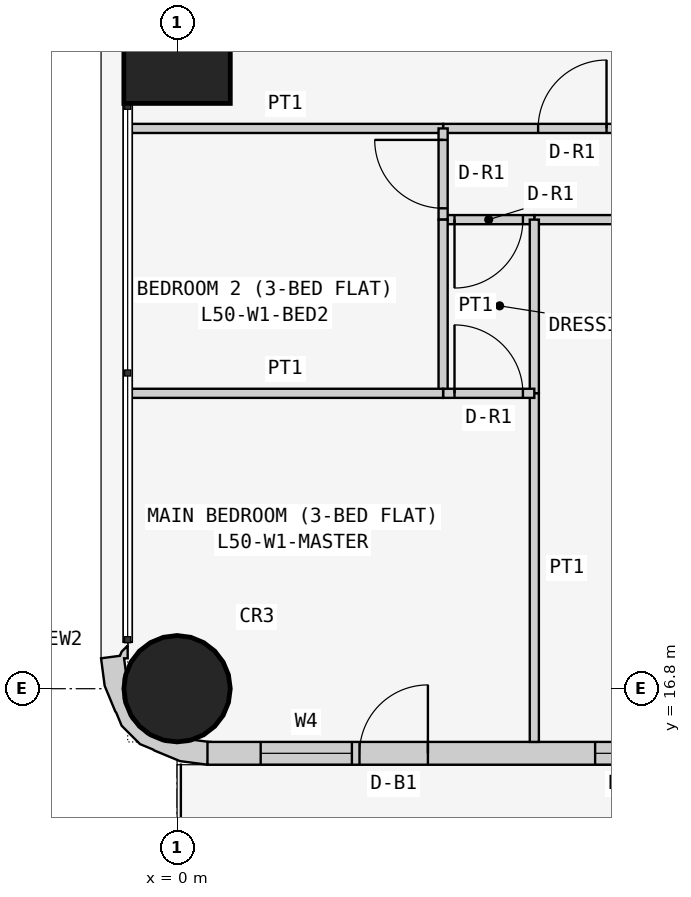
"""IFC4 building model, lengths in metres.
Left out: names, types, materials, properties, quantities, classifications, styles, units other than length and angle.
Written with IfcOpenShell. Run it as: python <this file> out.ifc"""

import sys

from ifc_helpers import new_model, si_unit, direction, frame, frame_2d, origin, origin_2d, place, context, subcontext, project, spatial, polyline, rectangle, circle, outline, extrude, element, fill, save


model = new_model("IFC4")
c1 = context("Model", 3, precision=1e-05, world=origin(), true_north=direction((0.0, 1.0)))
c2 = subcontext(c1, "Body", "Model", "MODEL_VIEW")
j1 = project(units=[si_unit("LENGTHUNIT", "METRE"), si_unit("PLANEANGLEUNIT", "RADIAN")], contexts=[c1])
p1 = place(None, origin())
s1 = spatial("IfcSite", under=j1, at=p1, CompositionType="ELEMENT")
p2 = place(p1, origin())
s2 = spatial("IfcBuilding", under=s1, at=p2, CompositionType="ELEMENT")
p3 = place(p2, frame((0.0, 0.0, 194.1)))
s3 = spatial("IfcBuildingStorey", under=s2, at=p3, CompositionType="ELEMENT", Elevation=194.1)
p4 = place(p3, frame((0.0, 16.8, 0.0), z_axis=(0.0, 0.0, 1.0), x_axis=(1.0, 0.0, 0.0)))
e1 = element("IfcColumn", 1, at=p4, inside=s3, PredefinedType="COLUMN", context=c2, shape_type="SweptSolid", body=[
    extrude(circle(Radius=0.7, at=origin_2d()), origin(), (0.0, 0.0, 1.0), 3.6),
])
p5 = place(p3, frame((0.0, 25.2, 0.0), z_axis=(0.0, 0.0, 1.0), x_axis=(1.0, 0.0, 0.0)))
e2 = element("IfcColumn", 2, at=p5, inside=s3, PredefinedType="COLUMN", context=c2, shape_type="SweptSolid", body=[
    extrude(rectangle(XDim=1.4, YDim=1.4, at=origin_2d()), origin(), (0.0, 0.0, 1.0), 3.6),
])
p6 = place(p3, frame((0.4, 15.95, 0.0), z_axis=(0.0, 0.0, 1.0), x_axis=(1.0, 0.0, 0.0)))
e3 = element("IfcWall", 3, at=p6, inside=s3, PredefinedType="SOLIDWALL", context=c2, shape_type="SweptSolid", body=[
    extrude(rectangle(XDim=15.7, YDim=0.3, at=frame_2d((7.85, 0.0))), origin(), (0.0, 0.0, 1.0), 3.45),
])
p7 = place(p6, frame((12.4, 0.0, 0.9)))
e4 = element("IfcOpeningElement", 4, at=p7, cuts=e3, PredefinedType="OPENING", context=c2, shape_type="SweptSolid", body=[
    extrude(rectangle(XDim=1.8, YDim=1.5, at=frame_2d((0.9, 0.75))), frame((0.0, 0.16, 0.0), z_axis=(0.0, -1.0, 0.0), x_axis=(1.0, 0.0, 0.0)), (0.0, 0.0, 1.0), 0.32),
])
p8 = place(p6, frame((9.55, 0.0, 1.5)))
e5 = element("IfcOpeningElement", 5, at=p8, cuts=e3, PredefinedType="OPENING", context=c2, shape_type="SweptSolid", body=[
    extrude(rectangle(XDim=0.9, YDim=0.7, at=frame_2d((0.45, 0.35))), frame((0.0, 0.16, 0.0), z_axis=(0.0, -1.0, 0.0), x_axis=(1.0, 0.0, 0.0)), (0.0, 0.0, 1.0), 0.32),
])
p9 = place(p6, frame((5.1, 0.0, 0.9)))
e6 = element("IfcOpeningElement", 6, at=p9, cuts=e3, PredefinedType="OPENING", context=c2, shape_type="SweptSolid", body=[
    extrude(rectangle(XDim=1.8, YDim=1.5, at=frame_2d((0.9, 0.75))), frame((0.0, 0.16, 0.0), z_axis=(0.0, -1.0, 0.0), x_axis=(1.0, 0.0, 0.0)), (0.0, 0.0, 1.0), 0.32),
])
p10 = place(p6, frame((2.0, 0.0, 0.0)))
e7 = element("IfcOpeningElement", 7, at=p10, cuts=e3, PredefinedType="OPENING", context=c2, shape_type="SweptSolid", body=[
    extrude(rectangle(XDim=0.9, YDim=2.4, at=frame_2d((0.45, 1.2))), frame((0.0, 0.16, 0.0), z_axis=(0.0, -1.0, 0.0), x_axis=(1.0, 0.0, 0.0)), (0.0, 0.0, 1.0), 0.32),
])
p11 = place(p6, frame((0.7, 0.0, 0.9)))
e8 = element("IfcOpeningElement", 8, at=p11, cuts=e3, PredefinedType="OPENING", context=c2, shape_type="SweptSolid", body=[
    extrude(rectangle(XDim=1.2, YDim=1.5, at=frame_2d((0.6, 0.75))), frame((0.0, 0.16, 0.0), z_axis=(0.0, -1.0, 0.0), x_axis=(1.0, 0.0, 0.0)), (0.0, 0.0, 1.0), 0.32),
])
p12 = place(p3, frame((-0.588, 17.312, 0.0), z_axis=(0.0, 0.0, 1.0), x_axis=(-0.898030234854, -0.439933741929, 0.0)))
e9 = element("IfcWall", 9, at=p12, inside=s3, PredefinedType="SOLIDWALL", context=c2, shape_type="SweptSolid", body=[
    extrude(outline(polyline([(-0.222, 1.793), (-0.39, 1.541), (-0.372, 1.532), (-0.195, 1.415), (-0.12, 1.41), (0.131, 1.287), (0.315, 1.078), (0.406, 0.814), (0.388, 0.536), (0.265, 0.285), (0.209, 0.236), (0.148, 0.053), (0.105, 0.074), (0.032, -0.076), (0.138, -0.039), (0.182, -0.0), (0.419, -0.08), (0.536, 0.266), (0.559, 0.631), (0.555, 0.651), (0.566, 0.836), (0.456, 1.159), (0.333, 1.298), (0.324, 1.316), (0.082, 1.591), (-0.222, 1.793)])), origin(), (0.0, 0.0, 1.0), 3.45),
])
p13 = place(p3, frame((3.5, 24.171, 0.0), z_axis=(0.0, 0.0, 1.0), x_axis=(1.0, 0.0, 0.0)))
e10 = element("IfcWall", 10, at=p13, inside=s3, PredefinedType="PARTITIONING", context=c2, shape_type="SweptSolid", body=[
    extrude(rectangle(XDim=2.7, YDim=0.12, at=frame_2d((1.35, 0.0))), origin(), (0.0, 0.0, 1.0), 3.45),
])
p14 = place(p13, frame((1.25, 0.0, 0.0)))
e11 = element("IfcOpeningElement", 11, at=p14, cuts=e10, PredefinedType="OPENING", context=c2, shape_type="SweptSolid", body=[
    extrude(rectangle(XDim=0.9, YDim=2.1, at=frame_2d((0.45, 1.05))), frame((0.0, 0.07, 0.0), z_axis=(0.0, -1.0, 0.0), x_axis=(1.0, 0.0, 0.0)), (0.0, 0.0, 1.0), 0.14),
])
p15 = place(p3, frame((-0.65, 24.171, 0.0), z_axis=(0.0, 0.0, 1.0), x_axis=(1.0, 0.0, 0.0)))
e12 = element("IfcWall", 12, at=p15, inside=s3, PredefinedType="PARTITIONING", context=c2, shape_type="SweptSolid", body=[
    extrude(rectangle(XDim=4.15, YDim=0.12, at=frame_2d((2.075, 0.0))), origin(), (0.0, 0.0, 1.0), 3.45),
])
p16 = place(p3, frame((4.7, 22.971, 0.0), z_axis=(0.0, 0.0, 1.0), x_axis=(1.0, 0.0, 0.0)))
e13 = element("IfcWall", 13, at=p16, inside=s3, PredefinedType="PARTITIONING", context=c2, shape_type="SweptSolid", body=[
    extrude(rectangle(XDim=4.9, YDim=0.12, at=frame_2d((2.45, 0.0))), origin(), (0.0, 0.0, 1.0), 3.45),
])
p17 = place(p16, frame((1.65, 0.0, 0.0)))
e14 = element("IfcOpeningElement", 14, at=p17, cuts=e13, PredefinedType="OPENING", context=c2, shape_type="SweptSolid", body=[
    extrude(rectangle(XDim=0.9, YDim=2.1, at=frame_2d((0.45, 1.05))), frame((0.0, 0.07, 0.0), z_axis=(0.0, -1.0, 0.0), x_axis=(1.0, 0.0, 0.0)), (0.0, 0.0, 1.0), 0.14),
])
p18 = place(p3, frame((3.5, 22.971, 0.0), z_axis=(0.0, 0.0, 1.0), x_axis=(1.0, 0.0, 0.0)))
e15 = element("IfcWall", 15, at=p18, inside=s3, PredefinedType="PARTITIONING", context=c2, shape_type="SweptSolid", body=[
    extrude(rectangle(XDim=1.2, YDim=0.12, at=frame_2d((0.6, 0.0))), origin(), (0.0, 0.0, 1.0), 3.45),
])
p19 = place(p18, frame((0.15, 0.0, 0.0)))
e16 = element("IfcOpeningElement", 16, at=p19, cuts=e15, PredefinedType="OPENING", context=c2, shape_type="SweptSolid", body=[
    extrude(rectangle(XDim=0.9, YDim=2.1, at=frame_2d((0.45, 1.05))), frame((0.0, 0.07, 0.0), z_axis=(0.0, -1.0, 0.0), x_axis=(1.0, 0.0, 0.0)), (0.0, 0.0, 1.0), 0.14),
])
p20 = place(p3, frame((3.5, 24.171, 0.0), z_axis=(0.0, 0.0, 1.0), x_axis=(0.0, -1.0, 0.0)))
e17 = element("IfcWall", 17, at=p20, inside=s3, PredefinedType="PARTITIONING", context=c2, shape_type="SweptSolid", body=[
    extrude(rectangle(XDim=1.2, YDim=0.12, at=frame_2d((0.6, 0.0))), origin(), (0.0, 0.0, 1.0), 3.45),
])
p21 = place(p20, frame((0.151, 0.0, 0.0)))
e18 = element("IfcOpeningElement", 18, at=p21, cuts=e17, PredefinedType="OPENING", context=c2, shape_type="SweptSolid", body=[
    extrude(rectangle(XDim=0.9, YDim=2.1, at=frame_2d((0.45, 1.05))), frame((0.0, 0.07, 0.0), z_axis=(0.0, -1.0, 0.0), x_axis=(1.0, 0.0, 0.0)), (0.0, 0.0, 1.0), 0.14),
])
p22 = place(p3, frame((4.7, 22.971, 0.0), z_axis=(0.0, 0.0, 1.0), x_axis=(0.0, -1.0, 0.0)))
e19 = element("IfcWall", 19, at=p22, inside=s3, PredefinedType="PARTITIONING", context=c2, shape_type="SweptSolid", body=[
    extrude(rectangle(XDim=2.285, YDim=0.12, at=frame_2d((1.143, 0.0))), origin(), (0.0, 0.0, 1.0), 3.45),
])
p23 = place(p3, frame((4.7, 20.686, 0.0), z_axis=(0.0, 0.0, 1.0), x_axis=(0.0, -1.0, 0.0)))
e20 = element("IfcWall", 20, at=p23, inside=s3, PredefinedType="PARTITIONING", context=c2, shape_type="SweptSolid", body=[
    extrude(rectangle(XDim=4.586, YDim=0.12, at=frame_2d((2.293, 0.0))), origin(), (0.0, 0.0, 1.0), 3.45),
])
p24 = place(p3, frame((3.5, 22.971, 0.0), z_axis=(0.0, 0.0, 1.0), x_axis=(0.0, -1.0, 0.0)))
e21 = element("IfcWall", 21, at=p24, inside=s3, PredefinedType="PARTITIONING", context=c2, shape_type="SweptSolid", body=[
    extrude(rectangle(XDim=2.285, YDim=0.12, at=frame_2d((1.143, 0.0))), origin(), (0.0, 0.0, 1.0), 3.45),
])
p25 = place(p3, frame((3.5, 20.686, 0.0), z_axis=(0.0, 0.0, 1.0), x_axis=(1.0, 0.0, 0.0)))
e22 = element("IfcWall", 22, at=p25, inside=s3, PredefinedType="PARTITIONING", context=c2, shape_type="SweptSolid", body=[
    extrude(rectangle(XDim=1.2, YDim=0.12, at=frame_2d((0.6, 0.0))), origin(), (0.0, 0.0, 1.0), 3.45),
])
p26 = place(p25, frame((0.15, 0.0, 0.0)))
e23 = element("IfcOpeningElement", 23, at=p26, cuts=e22, PredefinedType="OPENING", context=c2, shape_type="SweptSolid", body=[
    extrude(rectangle(XDim=0.9, YDim=2.1, at=frame_2d((0.45, 1.05))), frame((0.0, 0.07, 0.0), z_axis=(0.0, -1.0, 0.0), x_axis=(1.0, 0.0, 0.0)), (0.0, 0.0, 1.0), 0.14),
])
p27 = place(p3, frame((-0.65, 20.686, 0.0), z_axis=(0.0, 0.0, 1.0), x_axis=(1.0, 0.0, 0.0)))
e24 = element("IfcWall", 24, at=p27, inside=s3, PredefinedType="PARTITIONING", context=c2, shape_type="SweptSolid", body=[
    extrude(rectangle(XDim=4.15, YDim=0.12, at=frame_2d((2.075, 0.0))), origin(), (0.0, 0.0, 1.0), 3.45),
])
p28 = place(p9, origin())
e25 = element("IfcWindow", 25, at=p28, inside=s3, PartitioningType="SINGLE_PANEL", PredefinedType="WINDOW", context=c2, shape_type="SweptSolid", body=[
    extrude(rectangle(XDim=1.8, YDim=1.5, at=frame_2d((0.9, 0.75))), frame((0.0, 0.03, 0.0), z_axis=(0.0, -1.0, 0.0), x_axis=(1.0, 0.0, 0.0)), (0.0, 0.0, 1.0), 0.06),
])
fill(e6, e25)
p29 = place(p10, origin())
e26 = element("IfcDoor", 26, at=p29, inside=s3, OperationType="SINGLE_SWING_RIGHT", PredefinedType="DOOR", context=c2, shape_type="SweptSolid", body=[
    extrude(rectangle(XDim=0.9, YDim=2.4, at=frame_2d((0.45, 1.2))), frame((0.0, 0.025, 0.0), z_axis=(0.0, -1.0, 0.0), x_axis=(1.0, 0.0, 0.0)), (0.0, 0.0, 1.0), 0.05),
])
fill(e7, e26)
p30 = place(p11, origin())
e27 = element("IfcWindow", 27, at=p30, inside=s3, PartitioningType="SINGLE_PANEL", PredefinedType="WINDOW", context=c2, shape_type="SweptSolid", body=[
    extrude(rectangle(XDim=1.2, YDim=1.5, at=frame_2d((0.6, 0.75))), frame((0.0, 0.03, 0.0), z_axis=(0.0, -1.0, 0.0), x_axis=(1.0, 0.0, 0.0)), (0.0, 0.0, 1.0), 0.06),
])
fill(e8, e27)
p31 = place(p14, origin())
e28 = element("IfcDoor", 28, at=p31, inside=s3, OperationType="SINGLE_SWING_RIGHT", PredefinedType="DOOR", context=c2, shape_type="SweptSolid", body=[
    extrude(rectangle(XDim=0.9, YDim=2.1, at=frame_2d((0.45, 1.05))), frame((0.0, 0.025, 0.0), z_axis=(0.0, -1.0, 0.0), x_axis=(1.0, 0.0, 0.0)), (0.0, 0.0, 1.0), 0.05),
])
fill(e11, e28)
p32 = place(p19, frame((0.9, 0.0, 0.0), z_axis=(0.0, 0.0, 1.0), x_axis=(-1.0, 0.0, 0.0)))
e29 = element("IfcDoor", 29, at=p32, inside=s3, OperationType="SINGLE_SWING_RIGHT", PredefinedType="DOOR", context=c2, shape_type="SweptSolid", body=[
    extrude(rectangle(XDim=0.9, YDim=2.1, at=frame_2d((0.45, 1.05))), frame((0.0, 0.025, 0.0), z_axis=(0.0, -1.0, 0.0), x_axis=(1.0, 0.0, 0.0)), (0.0, 0.0, 1.0), 0.05),
])
fill(e16, e29)
p33 = place(p26, origin())
e30 = element("IfcDoor", 30, at=p33, inside=s3, OperationType="SINGLE_SWING_LEFT", PredefinedType="DOOR", context=c2, shape_type="SweptSolid", body=[
    extrude(rectangle(XDim=0.9, YDim=2.1, at=frame_2d((0.45, 1.05))), frame((0.0, 0.025, 0.0), z_axis=(0.0, -1.0, 0.0), x_axis=(1.0, 0.0, 0.0)), (0.0, 0.0, 1.0), 0.05),
])
fill(e23, e30)
p34 = place(p21, frame((0.9, 0.0, 0.0), z_axis=(0.0, 0.0, 1.0), x_axis=(-1.0, 0.0, 0.0)))
e31 = element("IfcDoor", 31, at=p34, inside=s3, OperationType="SINGLE_SWING_RIGHT", PredefinedType="DOOR", context=c2, shape_type="SweptSolid", body=[
    extrude(rectangle(XDim=0.9, YDim=2.1, at=frame_2d((0.45, 1.05))), frame((0.0, 0.025, 0.0), z_axis=(0.0, -1.0, 0.0), x_axis=(1.0, 0.0, 0.0)), (0.0, 0.0, 1.0), 0.05),
])
fill(e18, e31)
save(model, sys.argv[1])
